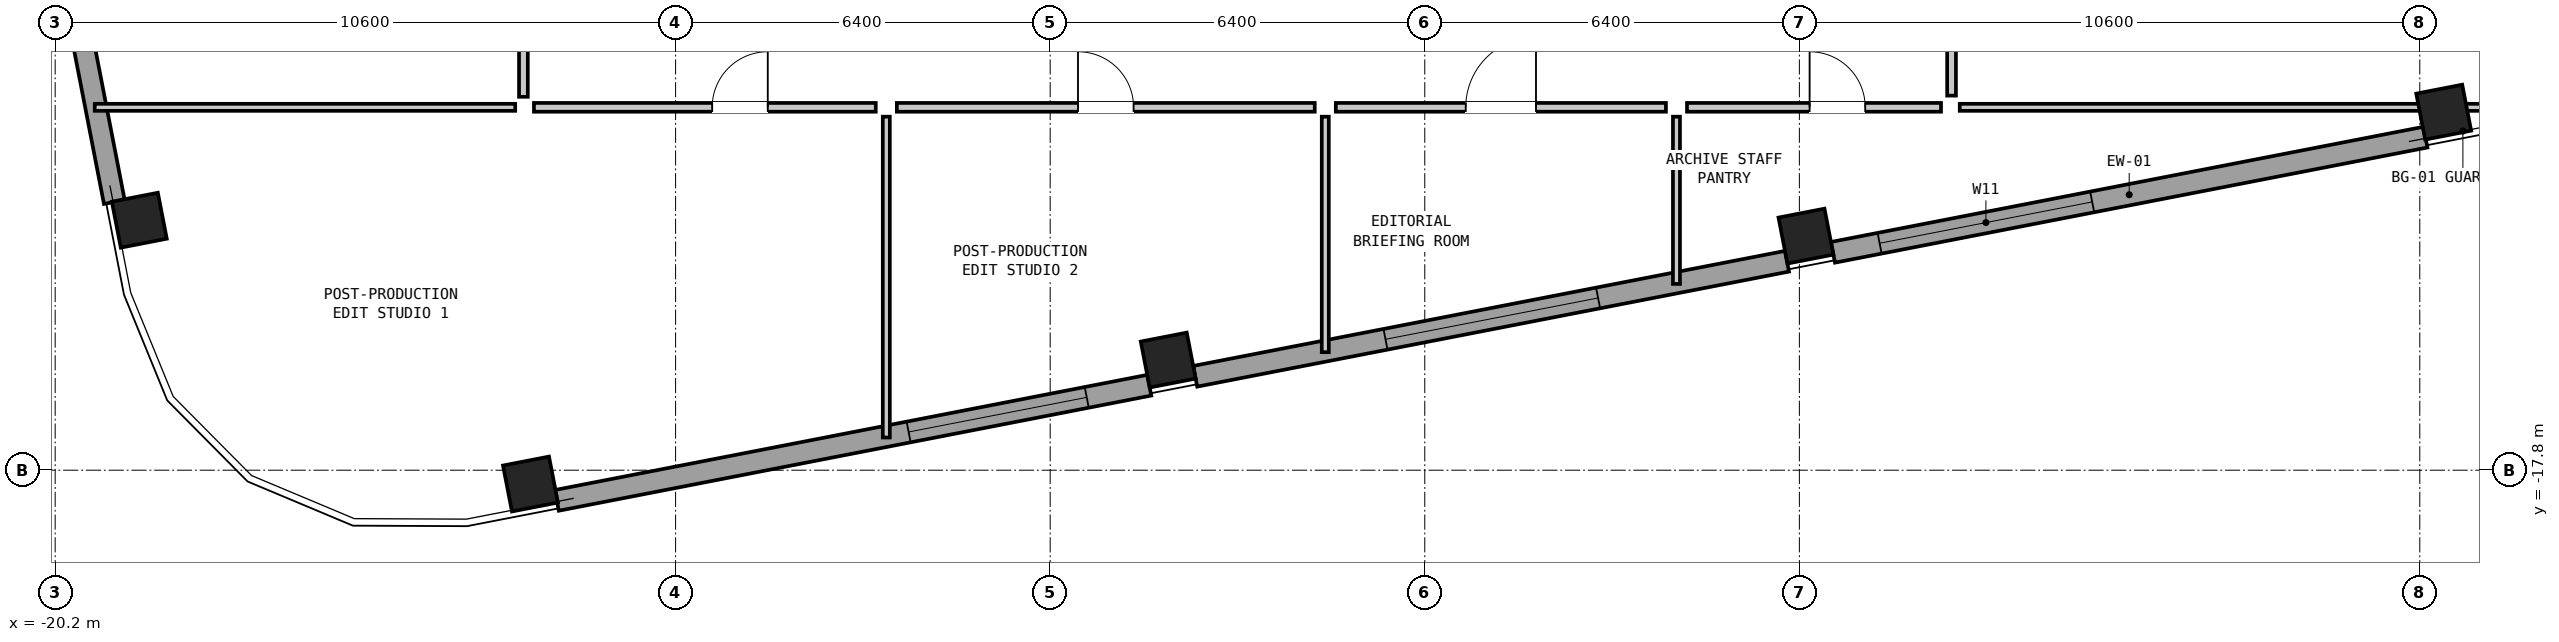
"""IFC4 building model, lengths in metres.
Left out: names, types, materials, properties, quantities, classifications, styles, units other than length and angle.
Written with IfcOpenShell. Run it as: python <this file> out.ifc"""

import sys

from ifc_helpers import new_model, si_unit, direction, frame, frame_2d, origin, origin_2d, place, context, subcontext, project, spatial, rectangle, hollow_rectangle, extrude, element, fill, save


model = new_model("IFC4")
c1 = context("Model", 3, precision=1e-05, world=origin(), true_north=direction((0.0, 1.0)))
c2 = subcontext(c1, "Body", "Model", "MODEL_VIEW")
j1 = project(units=[si_unit("LENGTHUNIT", "METRE"), si_unit("PLANEANGLEUNIT", "RADIAN")], contexts=[c1])
p1 = place(None, origin())
s1 = spatial("IfcSite", under=j1, at=p1, CompositionType="ELEMENT")
p2 = place(p1, origin())
s2 = spatial("IfcBuilding", under=s1, at=p2, CompositionType="ELEMENT")
p3 = place(p2, frame((0.0, 0.0, 131.1)))
s3 = spatial("IfcBuildingStorey", under=s2, at=p3, CompositionType="ELEMENT", Elevation=131.1)
for number, where, z_axis, x_axis in (
    (1, (-12.08, -18.036, 0.0), (0.0, 0.0, 1.0), (0.982, 0.191, 0.0)),
    (2, (-1.183, -15.918, 0.0), (0.0, 0.0, 1.0), (0.982, 0.191, 0.0)),
    (3, (9.713, -13.8, 0.0), (0.0, 0.0, 1.0), (0.982, 0.191, 0.0)),
    (4, (20.609, -11.682, 0.0), (0.0, 0.0, 1.0), (0.982, 0.191, 0.0)),
    (5, (-18.762, -13.529, 0.0), (0.0, 0.0, 1.0), (-0.191, 0.982, 0.0)),
):
    element("IfcColumn", number, at=place(p3, frame(where, z_axis=z_axis, x_axis=x_axis)), inside=s3, PredefinedType="COLUMN", context=c2, shape_type="SweptSolid", body=[
        extrude(hollow_rectangle(XDim=0.8, YDim=0.8, WallThickness=0.05, at=origin_2d()), origin(), (0.0, 0.0, 1.0), 3.05),
    ])
p4 = place(p3, frame((20.296, -12.11, 0.0), z_axis=(0.0, 0.0, 1.0), x_axis=(-0.981628941133, -0.190799952646, 0.0)))
e6 = element("IfcWall", 6, at=p4, inside=s3, PredefinedType="SOLIDWALL", context=c2, shape_type="SweptSolid", body=[
    extrude(rectangle(XDim=10.312, YDim=0.36, at=frame_2d((5.156, 0.0))), origin(), (0.0, 0.0, 1.0), 2.067),
])
p5 = place(p4, frame((5.8, 0.0, 0.2)))
e7 = element("IfcOpeningElement", 7, at=p5, cuts=e6, PredefinedType="OPENING", context=c2, shape_type="SweptSolid", body=[
    extrude(rectangle(XDim=3.7, YDim=1.1, at=frame_2d((1.85, 0.55))), frame((0.0, 0.192, 0.0), z_axis=(0.0, -1.0, 0.0), x_axis=(1.0, 0.0, 0.0)), (0.0, 0.0, 1.0), 0.384),
])
p6 = place(p3, frame((9.389, -14.23, 0.0), z_axis=(0.0, 0.0, 1.0), x_axis=(-0.981627477005, -0.190807485147, 0.0)))
e8 = element("IfcWall", 8, at=p6, inside=s3, PredefinedType="SOLIDWALL", context=c2, shape_type="SweptSolid", body=[
    extrude(rectangle(XDim=10.3, YDim=0.36, at=frame_2d((5.15, 0.0))), origin(), (0.0, 0.0, 1.0), 2.067),
])
p7 = place(p6, frame((3.288, 0.0, 0.2)))
e9 = element("IfcOpeningElement", 9, at=p7, cuts=e8, PredefinedType="OPENING", context=c2, shape_type="SweptSolid", body=[
    extrude(rectangle(XDim=3.7, YDim=1.1, at=frame_2d((1.85, 0.55))), frame((0.0, 0.192, 0.0), z_axis=(0.0, -1.0, 0.0), x_axis=(1.0, 0.0, 0.0)), (0.0, 0.0, 1.0), 0.384),
])
p8 = place(p3, frame((-1.507, -16.348, 0.0), z_axis=(0.0, 0.0, 1.0), x_axis=(-0.981628941133, -0.190799952646, 0.0)))
e10 = element("IfcWall", 10, at=p8, inside=s3, PredefinedType="SOLIDWALL", context=c2, shape_type="SweptSolid", body=[
    extrude(rectangle(XDim=10.312, YDim=0.36, at=frame_2d((5.156, 0.0))), origin(), (0.0, 0.0, 1.0), 2.067),
])
p9 = place(p8, frame((1.088, 0.0, 0.2)))
e11 = element("IfcOpeningElement", 11, at=p9, cuts=e10, PredefinedType="OPENING", context=c2, shape_type="SweptSolid", body=[
    extrude(rectangle(XDim=3.1, YDim=1.25, at=frame_2d((1.55, 0.625))), frame((0.0, 0.192, 0.0), z_axis=(0.0, -1.0, 0.0), x_axis=(1.0, 0.0, 0.0)), (0.0, 0.0, 1.0), 0.384),
])
p10 = place(p3, frame((-19.19, -13.217, 0.0), z_axis=(0.0, 0.0, 1.0), x_axis=(-0.190822765986, 0.981624506612, 0.0)))
e12 = element("IfcWall", 12, at=p10, inside=s3, PredefinedType="SOLIDWALL", context=c2, shape_type="SweptSolid", body=[
    extrude(rectangle(XDim=10.312, YDim=0.36, at=frame_2d((5.156, 0.0))), origin(), (0.0, 0.0, 1.0), 2.067),
])
p11 = place(p10, frame((5.6, 0.0, 0.2)))
e13 = element("IfcOpeningElement", 13, at=p11, cuts=e12, PredefinedType="OPENING", context=c2, shape_type="SweptSolid", body=[
    extrude(rectangle(XDim=4.1, YDim=1.05, at=frame_2d((2.05, 0.525))), frame((0.0, 0.192, 0.0), z_axis=(0.0, -1.0, 0.0), x_axis=(1.0, 0.0, 0.0)), (0.0, 0.0, 1.0), 0.384),
])
p12 = place(p3, frame((-19.524, -11.6, 0.0), z_axis=(0.0, 0.0, 1.0), x_axis=(1.0, 0.0, 0.0)))
e14 = element("IfcWall", 14, at=p12, inside=s3, PredefinedType="PARTITIONING", context=c2, shape_type="SweptSolid", body=[
    extrude(rectangle(XDim=7.184, YDim=0.12, at=frame_2d((3.592, 0.0))), origin(), (0.0, 0.0, 1.0), 2.347),
])
p13 = place(p3, frame((12.34, -11.6, 0.0), z_axis=(0.0, 0.0, 1.0), x_axis=(1.0, 0.0, 0.0)))
e15 = element("IfcWall", 15, at=p13, inside=s3, PredefinedType="PARTITIONING", context=c2, shape_type="SweptSolid", body=[
    extrude(rectangle(XDim=10.066, YDim=0.12, at=frame_2d((5.033, 0.0))), origin(), (0.0, 0.0, 1.0), 2.127),
])
p14 = place(p3, frame((-6.0, -17.242, 0.0), z_axis=(0.0, 0.0, 1.0), x_axis=(0.0, 1.0, 0.0)))
e16 = element("IfcWall", 16, at=p14, inside=s3, PredefinedType="PARTITIONING", context=c2, shape_type="SweptSolid", body=[
    extrude(rectangle(XDim=5.482, YDim=0.12, at=frame_2d((2.741, 0.0))), origin(), (0.0, 0.0, 1.0), 2.347),
])
p15 = place(p3, frame((1.5, -15.784, 0.0), z_axis=(0.0, 0.0, 1.0), x_axis=(0.0, 1.0, 0.0)))
e17 = element("IfcWall", 17, at=p15, inside=s3, PredefinedType="PARTITIONING", context=c2, shape_type="SweptSolid", body=[
    extrude(rectangle(XDim=4.024, YDim=0.12, at=frame_2d((2.012, 0.0))), origin(), (0.0, 0.0, 1.0), 2.83),
])
p16 = place(p3, frame((7.5, -14.617, 0.0), z_axis=(0.0, 0.0, 1.0), x_axis=(0.0, 1.0, 0.0)))
e18 = element("IfcWall", 18, at=p16, inside=s3, PredefinedType="PARTITIONING", context=c2, shape_type="SweptSolid", body=[
    extrude(rectangle(XDim=2.857, YDim=0.12, at=frame_2d((1.429, 0.0))), origin(), (0.0, 0.0, 1.0), 2.83),
])
p17 = place(p3, frame((-12.02, -11.6, 0.0), z_axis=(0.0, 0.0, 1.0), x_axis=(1.0, 0.0, 0.0)))
e19 = element("IfcWall", 19, at=p17, inside=s3, PredefinedType="PARTITIONING", context=c2, shape_type="SweptSolid", body=[
    extrude(rectangle(XDim=5.84, YDim=0.15, at=frame_2d((2.92, 0.0))), origin(), (0.0, 0.0, 1.0), 2.347),
])
p18 = place(p17, frame((3.045, 0.0, 0.0)))
e20 = element("IfcOpeningElement", 20, at=p18, cuts=e19, PredefinedType="OPENING", context=c2, shape_type="SweptSolid", body=[
    extrude(rectangle(XDim=0.95, YDim=2.1, at=frame_2d((0.475, 1.05))), frame((0.0, 0.087, 0.0), z_axis=(0.0, -1.0, 0.0), x_axis=(1.0, 0.0, 0.0)), (0.0, 0.0, 1.0), 0.174),
])
p19 = place(p3, frame((-5.82, -11.6, 0.0), z_axis=(0.0, 0.0, 1.0), x_axis=(1.0, 0.0, 0.0)))
e21 = element("IfcWall", 21, at=p19, inside=s3, PredefinedType="PARTITIONING", context=c2, shape_type="SweptSolid", body=[
    extrude(rectangle(XDim=7.14, YDim=0.15, at=frame_2d((3.57, 0.0))), origin(), (0.0, 0.0, 1.0), 2.83),
])
p20 = place(p19, frame((3.095, 0.0, 0.0)))
e22 = element("IfcOpeningElement", 22, at=p20, cuts=e21, PredefinedType="OPENING", context=c2, shape_type="SweptSolid", body=[
    extrude(rectangle(XDim=0.95, YDim=2.1, at=frame_2d((0.475, 1.05))), frame((0.0, 0.087, 0.0), z_axis=(0.0, -1.0, 0.0), x_axis=(1.0, 0.0, 0.0)), (0.0, 0.0, 1.0), 0.174),
])
p21 = place(p3, frame((1.68, -11.6, 0.0), z_axis=(0.0, 0.0, 1.0), x_axis=(1.0, 0.0, 0.0)))
e23 = element("IfcWall", 23, at=p21, inside=s3, PredefinedType="PARTITIONING", context=c2, shape_type="SweptSolid", body=[
    extrude(rectangle(XDim=5.64, YDim=0.15, at=frame_2d((2.82, 0.0))), origin(), (0.0, 0.0, 1.0), 2.83),
])
p22 = place(p21, frame((2.22, 0.0, 0.0)))
e24 = element("IfcOpeningElement", 24, at=p22, cuts=e23, PredefinedType="OPENING", context=c2, shape_type="SweptSolid", body=[
    extrude(rectangle(XDim=1.2, YDim=2.1, at=frame_2d((0.6, 1.05))), frame((0.0, 0.087, 0.0), z_axis=(0.0, -1.0, 0.0), x_axis=(1.0, 0.0, 0.0)), (0.0, 0.0, 1.0), 0.174),
])
p23 = place(p3, frame((7.68, -11.6, 0.0), z_axis=(0.0, 0.0, 1.0), x_axis=(1.0, 0.0, 0.0)))
e25 = element("IfcWall", 25, at=p23, inside=s3, PredefinedType="PARTITIONING", context=c2, shape_type="SweptSolid", body=[
    extrude(rectangle(XDim=4.34, YDim=0.15, at=frame_2d((2.17, 0.0))), origin(), (0.0, 0.0, 1.0), 2.347),
])
p24 = place(p23, frame((2.095, 0.0, 0.0)))
e26 = element("IfcOpeningElement", 26, at=p24, cuts=e25, PredefinedType="OPENING", context=c2, shape_type="SweptSolid", body=[
    extrude(rectangle(XDim=0.95, YDim=2.1, at=frame_2d((0.475, 1.05))), frame((0.0, 0.087, 0.0), z_axis=(0.0, -1.0, 0.0), x_axis=(1.0, 0.0, 0.0)), (0.0, 0.0, 1.0), 0.174),
])
p25 = place(p3, frame((-12.2, -11.42, 0.0), z_axis=(0.0, 0.0, 1.0), x_axis=(0.0, 1.0, 0.0)))
e27 = element("IfcWall", 27, at=p25, inside=s3, PredefinedType="PARTITIONING", context=c2, shape_type="SweptSolid", body=[
    extrude(rectangle(XDim=8.24, YDim=0.15, at=frame_2d((4.12, 0.0))), origin(), (0.0, 0.0, 1.0), 2.83),
])
p26 = place(p25, frame((3.645, 0.0, 0.0)))
e28 = element("IfcOpeningElement", 28, at=p26, cuts=e27, PredefinedType="OPENING", context=c2, shape_type="SweptSolid", body=[
    extrude(rectangle(XDim=0.95, YDim=2.1, at=frame_2d((0.475, 1.05))), frame((0.0, 0.087, 0.0), z_axis=(0.0, -1.0, 0.0), x_axis=(1.0, 0.0, 0.0)), (0.0, 0.0, 1.0), 0.174),
])
p27 = place(p3, frame((12.2, -11.4, 0.0), z_axis=(0.0, 0.0, 1.0), x_axis=(0.0, 1.0, 0.0)))
e29 = element("IfcWall", 29, at=p27, inside=s3, PredefinedType="PARTITIONING", context=c2, shape_type="SweptSolid", body=[
    extrude(rectangle(XDim=8.84, YDim=0.15, at=frame_2d((4.42, 0.0))), origin(), (0.0, 0.0, 1.0), 2.83),
])
p28 = place(p27, frame((3.945, 0.0, 0.0)))
e30 = element("IfcOpeningElement", 30, at=p28, cuts=e29, PredefinedType="OPENING", context=c2, shape_type="SweptSolid", body=[
    extrude(rectangle(XDim=0.95, YDim=2.1, at=frame_2d((0.475, 1.05))), frame((0.0, 0.087, 0.0), z_axis=(0.0, -1.0, 0.0), x_axis=(1.0, 0.0, 0.0)), (0.0, 0.0, 1.0), 0.174),
])
p29 = place(p5, origin())
e31 = element("IfcWindow", 31, at=p29, inside=s3, PartitioningType="SINGLE_PANEL", PredefinedType="WINDOW", context=c2, shape_type="SweptSolid", body=[
    extrude(rectangle(XDim=3.7, YDim=1.1, at=frame_2d((1.85, 0.55))), frame((0.0, 0.03, 0.0), z_axis=(0.0, -1.0, 0.0), x_axis=(1.0, 0.0, 0.0)), (0.0, 0.0, 1.0), 0.06),
])
fill(e7, e31)
p30 = place(p7, origin())
e32 = element("IfcWindow", 32, at=p30, inside=s3, PartitioningType="SINGLE_PANEL", PredefinedType="WINDOW", context=c2, shape_type="SweptSolid", body=[
    extrude(rectangle(XDim=3.7, YDim=1.1, at=frame_2d((1.85, 0.55))), frame((0.0, 0.03, 0.0), z_axis=(0.0, -1.0, 0.0), x_axis=(1.0, 0.0, 0.0)), (0.0, 0.0, 1.0), 0.06),
])
fill(e9, e32)
p31 = place(p9, origin())
e33 = element("IfcWindow", 33, at=p31, inside=s3, PartitioningType="SINGLE_PANEL", PredefinedType="WINDOW", context=c2, shape_type="SweptSolid", body=[
    extrude(rectangle(XDim=3.1, YDim=1.25, at=frame_2d((1.55, 0.625))), frame((0.0, 0.03, 0.0), z_axis=(0.0, -1.0, 0.0), x_axis=(1.0, 0.0, 0.0)), (0.0, 0.0, 1.0), 0.06),
])
fill(e11, e33)
p32 = place(p18, origin())
e34 = element("IfcDoor", 34, at=p32, inside=s3, OperationType="SINGLE_SWING_RIGHT", PredefinedType="DOOR", context=c2, shape_type="SweptSolid", body=[
    extrude(rectangle(XDim=0.95, YDim=2.1, at=frame_2d((0.475, 1.05))), frame((0.0, 0.025, 0.0), z_axis=(0.0, -1.0, 0.0), x_axis=(1.0, 0.0, 0.0)), (0.0, 0.0, 1.0), 0.05),
])
fill(e20, e34)
p33 = place(p20, origin())
e35 = element("IfcDoor", 35, at=p33, inside=s3, OperationType="SINGLE_SWING_LEFT", PredefinedType="DOOR", context=c2, shape_type="SweptSolid", body=[
    extrude(rectangle(XDim=0.95, YDim=2.1, at=frame_2d((0.475, 1.05))), frame((0.0, 0.025, 0.0), z_axis=(0.0, -1.0, 0.0), x_axis=(1.0, 0.0, 0.0)), (0.0, 0.0, 1.0), 0.05),
])
fill(e22, e35)
p34 = place(p22, origin())
e36 = element("IfcDoor", 36, at=p34, inside=s3, OperationType="SINGLE_SWING_RIGHT", PredefinedType="DOOR", context=c2, shape_type="SweptSolid", body=[
    extrude(rectangle(XDim=1.2, YDim=2.1, at=frame_2d((0.6, 1.05))), frame((0.0, 0.025, 0.0), z_axis=(0.0, -1.0, 0.0), x_axis=(1.0, 0.0, 0.0)), (0.0, 0.0, 1.0), 0.05),
])
fill(e24, e36)
p35 = place(p24, origin())
e37 = element("IfcDoor", 37, at=p35, inside=s3, OperationType="SINGLE_SWING_LEFT", PredefinedType="DOOR", context=c2, shape_type="SweptSolid", body=[
    extrude(rectangle(XDim=0.95, YDim=2.1, at=frame_2d((0.475, 1.05))), frame((0.0, 0.025, 0.0), z_axis=(0.0, -1.0, 0.0), x_axis=(1.0, 0.0, 0.0)), (0.0, 0.0, 1.0), 0.05),
])
fill(e26, e37)
save(model, sys.argv[1])
